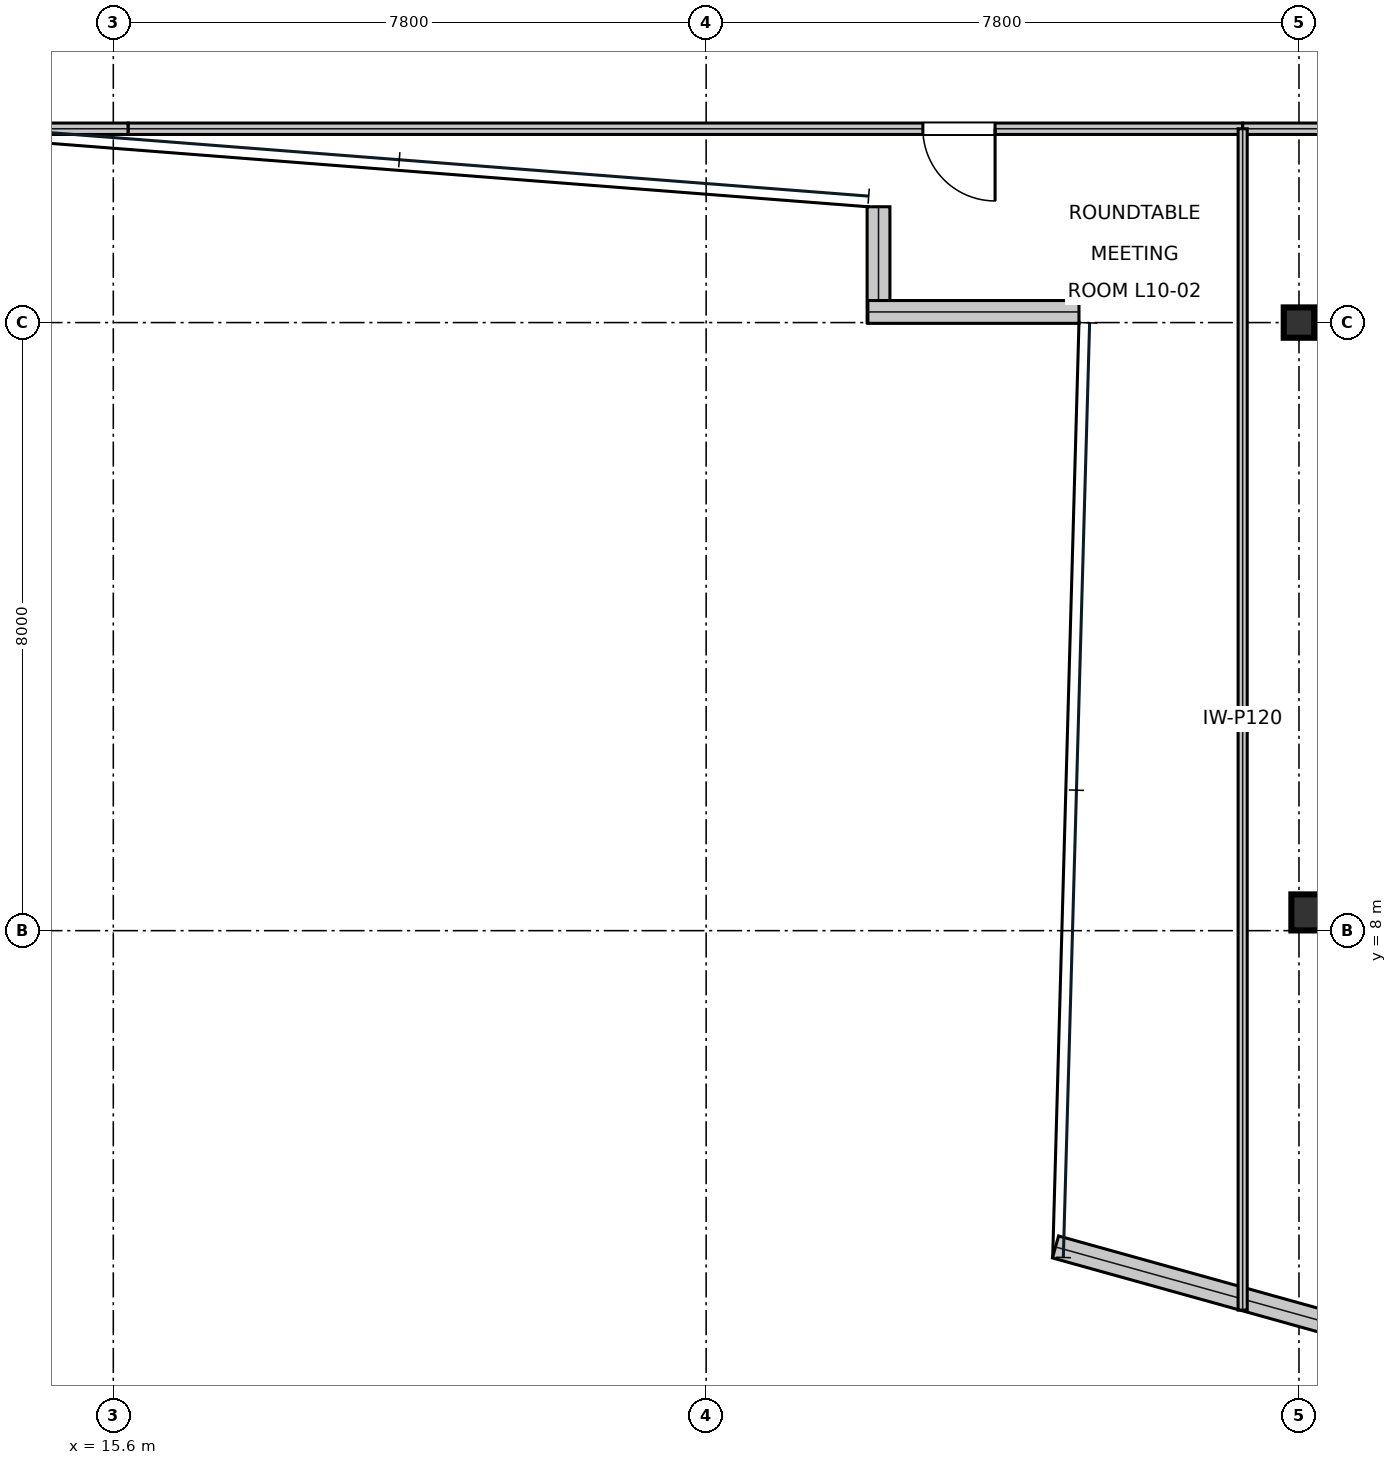
"""IFC4 building model, lengths in metres.
Left out: names, types, materials, properties, quantities, classifications, styles, units other than length and angle.
Written with IfcOpenShell. Run it as: python <this file> out.ifc"""

import sys

from ifc_helpers import new_model, si_unit, direction, frame, frame_2d, origin, origin_2d, place, context, subcontext, project, spatial, rectangle, i_section, extrude, element, fill, save


model = new_model("IFC4")
c1 = context("Model", 3, precision=1e-05, world=origin(), true_north=direction((0.0, 1.0)))
c2 = subcontext(c1, "Body", "Model", "MODEL_VIEW")
j1 = project(units=[si_unit("LENGTHUNIT", "METRE"), si_unit("PLANEANGLEUNIT", "RADIAN")], contexts=[c1])
p1 = place(None, origin())
s1 = spatial("IfcSite", under=j1, at=p1, CompositionType="ELEMENT")
p2 = place(p1, origin())
s2 = spatial("IfcBuilding", under=s1, at=p2, CompositionType="ELEMENT")
p3 = place(p2, frame((0.0, 0.0, 49.95)))
s3 = spatial("IfcBuildingStorey", under=s2, at=p3, CompositionType="ELEMENT", Elevation=49.95)
p4 = place(p3, frame((31.2, 16.0, 0.0), z_axis=(0.0, 0.0, 1.0), x_axis=(1.0, 0.0, 0.0)))
e1 = element("IfcColumn", 1, at=p4, inside=s3, PredefinedType="COLUMN", context=c2, shape_type="SweptSolid", body=[
    extrude(i_section(OverallWidth=0.401, OverallDepth=0.399, WebThickness=0.025, FlangeThickness=0.04, at=origin_2d()), origin(), (0.0, 0.0, 1.0), 4.044),
])
p5 = place(p3, frame((31.312, 8.24, 0.016), z_axis=(0.0, 0.0, 1.0), x_axis=(1.0, 0.0, 0.0)))
e2 = element("IfcColumn", 2, at=p5, inside=s3, PredefinedType="COLUMN", context=c2, shape_type="SweptSolid", body=[
    extrude(i_section(OverallWidth=0.424, OverallDepth=0.474, WebThickness=0.048, FlangeThickness=0.077, at=origin_2d()), origin(), (0.0, 0.0, 1.0), 4.018),
])
p6 = place(p3, frame((25.668, 17.524, 0.0), z_axis=(0.0, 0.0, 1.0), x_axis=(0.0, -1.0, 0.0)))
e3 = element("IfcWall", 3, at=p6, inside=s3, PredefinedType="STANDARD", context=c2, shape_type="SweptSolid", body=[
    extrude(rectangle(XDim=1.524, YDim=0.3, at=frame_2d((0.762, 0.0))), origin(), (0.0, 0.0, 1.0), 3.338),
])
p7 = place(p3, frame((25.528, 16.14, 0.0), z_axis=(0.0, 0.0, 1.0), x_axis=(1.0, 0.0, 0.0)))
e4 = element("IfcWall", 4, at=p7, inside=s3, PredefinedType="STANDARD", context=c2, shape_type="SweptSolid", body=[
    extrude(rectangle(XDim=2.777, YDim=0.3, at=frame_2d((1.389, 0.0))), origin(), (0.0, 0.0, 1.0), 3.81),
])
p8 = place(p3, frame((27.997, 3.839, 0.0), z_axis=(0.0, 0.0, 1.0), x_axis=(0.963365312104, -0.268192608836, 0.0)))
e5 = element("IfcWall", 5, at=p8, inside=s3, PredefinedType="STANDARD", context=c2, shape_type="SweptSolid", body=[
    extrude(rectangle(XDim=7.159, YDim=0.3, at=frame_2d((3.579, 0.0))), origin(), (0.0, 0.0, 1.0), 3.81),
])
p9 = place(p3, frame((15.794, 18.55, 0.0), z_axis=(0.0, 0.0, 1.0), x_axis=(1.0, 0.0, 0.0)))
e6 = element("IfcWall", 6, at=p9, inside=s3, PredefinedType="PARTITIONING", context=c2, shape_type="SweptSolid", body=[
    extrude(rectangle(XDim=14.665, YDim=0.15, at=frame_2d((7.333, 0.0))), origin(), (0.0, 0.0, 1.0), 3.338),
])
p10 = place(p9, frame((10.458, 0.0, 0.0)))
e7 = element("IfcOpeningElement", 7, at=p10, cuts=e6, PredefinedType="OPENING", context=c2, shape_type="SweptSolid", body=[
    extrude(rectangle(XDim=0.95, YDim=2.15, at=frame_2d((0.475, 1.075))), frame((0.0, 0.085, 0.0), z_axis=(0.0, -1.0, 0.0), x_axis=(1.0, 0.0, 0.0)), (0.0, 0.0, 1.0), 0.17),
])
p11 = place(p3, frame((30.459, 18.55, 0.0), z_axis=(0.0, 0.0, 1.0), x_axis=(1.0, 0.0, 0.0)))
e8 = element("IfcWall", 8, at=p11, inside=s3, PredefinedType="PARTITIONING", context=c2, shape_type="SweptSolid", body=[
    extrude(rectangle(XDim=2.941, YDim=0.15, at=frame_2d((1.47, 0.0))), origin(), (0.0, 0.0, 1.0), 3.181),
])
p12 = place(p3, frame((14.0, 18.55, 0.0), z_axis=(0.0, 0.0, 1.0), x_axis=(1.0, 0.0, 0.0)))
e9 = element("IfcWall", 9, at=p12, inside=s3, PredefinedType="PARTITIONING", context=c2, shape_type="SweptSolid", body=[
    extrude(rectangle(XDim=1.794, YDim=0.15, at=frame_2d((0.897, 0.0))), origin(), (0.0, 0.0, 1.0), 3.81),
])
p13 = place(p3, frame((30.459, 3.008, 0.0), z_axis=(0.0, 0.0, 1.0), x_axis=(0.0, 1.0, 0.0)))
e10 = element("IfcWall", 10, at=p13, inside=s3, PredefinedType="PARTITIONING", context=c2, shape_type="SweptSolid", body=[
    extrude(rectangle(XDim=15.542, YDim=0.12, at=frame_2d((7.771, 0.0))), origin(), (0.0, 0.0, 1.0), 3.338),
])
p14 = place(p10, frame((0.95, 0.0, 0.0), z_axis=(0.0, 0.0, 1.0), x_axis=(-1.0, 0.0, 0.0)))
e11 = element("IfcDoor", 11, at=p14, inside=s3, OperationType="SINGLE_SWING_LEFT", PredefinedType="DOOR", context=c2, shape_type="SweptSolid", body=[
    extrude(rectangle(XDim=0.95, YDim=2.15, at=frame_2d((0.475, 1.075))), frame((0.0, 0.025, 0.0), z_axis=(0.0, -1.0, 0.0), x_axis=(1.0, 0.0, 0.0)), (0.0, 0.0, 1.0), 0.05),
])
fill(e7, e11)
save(model, sys.argv[1])
